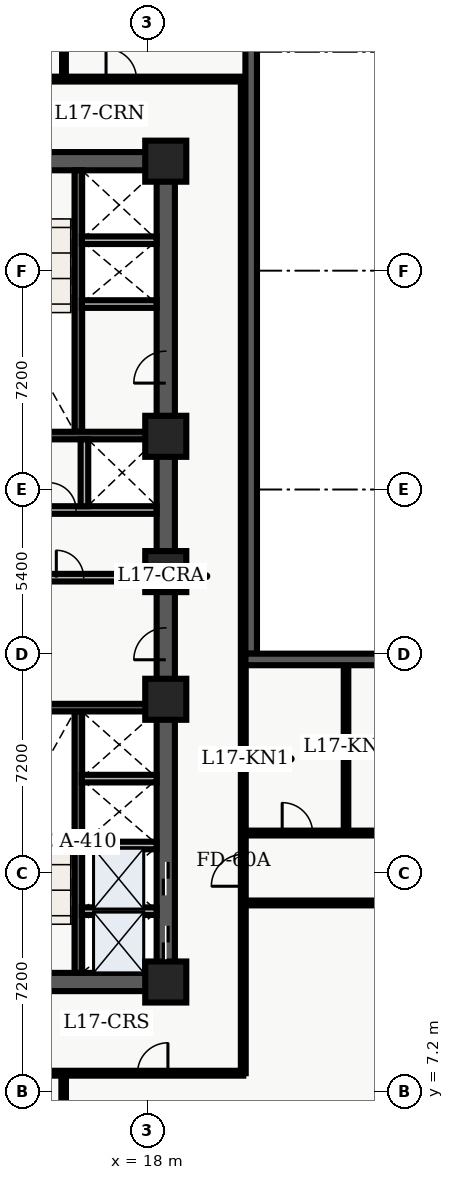
"""IFC4 building model, lengths in metres.
Left out: names, types, materials, properties, quantities, classifications, styles, units other than length and angle.
Written with IfcOpenShell. Run it as: python <this file> out.ifc"""

import sys

from ifc_helpers import new_model, entity, si_unit, converted_unit, direction, frame, origin_with_axes, origin_2d_with_axis, place, context, subcontext, project, spatial, polyline, rectangle, outline, extrude, element, fill, save


model = new_model("IFC4")
c1 = context("Model", 3, precision=1e-05, world=origin_with_axes(), true_north=direction((0.0, 1.0)))
c2 = subcontext(c1, "Body", "Model", "MODEL_VIEW")
j1 = project(units=[si_unit("LENGTHUNIT", "METRE"), converted_unit("PLANEANGLEUNIT", "DEGREE", entity("IfcPlaneAngleMeasure", 0.017), si_unit("PLANEANGLEUNIT", "RADIAN"), dimensions=[0, 0, 0, 0, 0, 0, 0])], contexts=[c1])
p1 = place(None, origin_with_axes())
s1 = spatial("IfcSite", under=j1, at=p1, CompositionType="ELEMENT")
p2 = place(p1, origin_with_axes())
s2 = spatial("IfcBuilding", under=s1, at=p2, CompositionType="ELEMENT")
p3 = place(p2, frame((0.0, 0.0, 71.7), z_axis=(0.0, 0.0, 1.0), x_axis=(1.0, 0.0, 0.0)))
s3 = spatial("IfcBuildingStorey", under=s2, at=p3, CompositionType="ELEMENT", Elevation=71.7)
p4 = place(p3, frame((11.4, 10.8, 0.0), z_axis=(0.0, 0.0, 1.0), x_axis=(1.0, 0.0, 0.0)))
e1 = element("IfcWall", 1, at=p4, inside=s3, PredefinedType="SHEAR", context=c2, shape_type="SweptSolid", body=[
    extrude(outline(polyline([(0.0, -0.3), (7.2, -0.3), (7.2, 0.3), (0.0, 0.3), (0.0, -0.3)])), origin_with_axes(), (0.0, 0.0, 1.0), 3.66),
])
p5 = place(p4, frame((2.625, 0.0, 0.0), z_axis=(0.0, 0.0, 1.0), x_axis=(1.0, 0.0, 0.0)))
e2 = element("IfcOpeningElement", 2, at=p5, cuts=e1, PredefinedType="OPENING", context=c2, shape_type="SweptSolid", body=[
    extrude(rectangle(XDim=1.05, YDim=0.62, at=origin_2d_with_axis()), origin_with_axes(), (0.0, 0.0, 1.0), 2.15),
])
p6 = place(p3, frame((11.4, 37.8, 0.0), z_axis=(0.0, 0.0, 1.0), x_axis=(1.0, 0.0, 0.0)))
e3 = element("IfcWall", 3, at=p6, inside=s3, PredefinedType="SHEAR", context=c2, shape_type="SweptSolid", body=[
    extrude(outline(polyline([(0.0, -0.3), (7.2, -0.3), (7.2, 0.3), (0.0, 0.3), (0.0, -0.3)])), origin_with_axes(), (0.0, 0.0, 1.0), 3.66),
])
p7 = place(p6, frame((2.625, 0.0, 0.0), z_axis=(0.0, 0.0, 1.0), x_axis=(1.0, 0.0, 0.0)))
e4 = element("IfcOpeningElement", 4, at=p7, cuts=e3, PredefinedType="OPENING", context=c2, shape_type="SweptSolid", body=[
    extrude(rectangle(XDim=1.05, YDim=0.62, at=origin_2d_with_axis()), origin_with_axes(), (0.0, 0.0, 1.0), 2.15),
])
p8 = place(p3, frame((18.6, 10.8, 0.0), z_axis=(0.0, 0.0, 1.0), x_axis=(0.0, 1.0, 0.0)))
e5 = element("IfcWall", 5, at=p8, inside=s3, PredefinedType="SHEAR", context=c2, shape_type="SweptSolid", body=[
    extrude(outline(polyline([(0.0, -0.3), (13.5, -0.3), (13.5, 0.3), (0.0, 0.3), (0.0, -0.3)])), origin_with_axes(), (0.0, 0.0, 1.0), 3.66),
])
p9 = place(p8, frame((1.3, 0.0, 0.0), z_axis=(0.0, 0.0, 1.0), x_axis=(1.0, 0.0, 0.0)))
e6 = element("IfcOpeningElement", 6, at=p9, cuts=e5, PredefinedType="OPENING", context=c2, shape_type="SweptSolid", body=[
    extrude(rectangle(XDim=1.1, YDim=0.62, at=origin_2d_with_axis()), origin_with_axes(), (0.0, 0.0, 1.0), 2.15),
])
p10 = place(p8, frame((3.4, 0.0, 0.0), z_axis=(0.0, 0.0, 1.0), x_axis=(1.0, 0.0, 0.0)))
e7 = element("IfcOpeningElement", 7, at=p10, cuts=e5, PredefinedType="OPENING", context=c2, shape_type="SweptSolid", body=[
    extrude(rectangle(XDim=1.1, YDim=0.62, at=origin_2d_with_axis()), origin_with_axes(), (0.0, 0.0, 1.0), 2.15),
])
p11 = place(p8, frame((11.125, 0.0, 0.0), z_axis=(0.0, 0.0, 1.0), x_axis=(1.0, 0.0, 0.0)))
e8 = element("IfcOpeningElement", 8, at=p11, cuts=e5, PredefinedType="OPENING", context=c2, shape_type="SweptSolid", body=[
    extrude(rectangle(XDim=1.05, YDim=0.62, at=origin_2d_with_axis()), origin_with_axes(), (0.0, 0.0, 1.0), 2.15),
])
p12 = place(p3, frame((18.6, 24.3, 0.0), z_axis=(0.0, 0.0, 1.0), x_axis=(0.0, 1.0, 0.0)))
e9 = element("IfcWall", 9, at=p12, inside=s3, PredefinedType="SHEAR", context=c2, shape_type="SweptSolid", body=[
    extrude(outline(polyline([(0.0, -0.3), (13.5, -0.3), (13.5, 0.3), (0.0, 0.3), (0.0, -0.3)])), origin_with_axes(), (0.0, 0.0, 1.0), 3.66),
])
p13 = place(p12, frame((6.725, 0.0, 0.0), z_axis=(0.0, 0.0, 1.0), x_axis=(1.0, 0.0, 0.0)))
e10 = element("IfcOpeningElement", 10, at=p13, cuts=e9, PredefinedType="OPENING", context=c2, shape_type="SweptSolid", body=[
    extrude(rectangle(XDim=1.05, YDim=0.62, at=origin_2d_with_axis()), origin_with_axes(), (0.0, 0.0, 1.0), 2.15),
])
p14 = place(p3, frame((15.725, 11.1, 0.0), z_axis=(0.0, 0.0, 1.0), x_axis=(0.0, 1.0, 0.0)))
e11 = element("IfcWall", 11, at=p14, inside=s3, PredefinedType="SHEAR", context=c2, shape_type="SweptSolid", body=[
    extrude(outline(polyline([(0.0, -0.125), (8.6, -0.125), (8.6, 0.125), (0.0, 0.125), (0.0, -0.125)])), origin_with_axes(), (0.0, 0.0, 1.0), 3.66),
])
p15 = place(p3, frame((11.7, 19.825, 0.0), z_axis=(0.0, 0.0, 1.0), x_axis=(1.0, 0.0, 0.0)))
e12 = element("IfcWall", 12, at=p15, inside=s3, PredefinedType="SHEAR", context=c2, shape_type="SweptSolid", body=[
    extrude(outline(polyline([(0.0, -0.125), (6.6, -0.125), (6.6, 0.125), (0.0, 0.125), (0.0, -0.125)])), origin_with_axes(), (0.0, 0.0, 1.0), 3.66),
])
p16 = place(p3, frame((15.725, 28.9, 0.0), z_axis=(0.0, 0.0, 1.0), x_axis=(0.0, 1.0, 0.0)))
e13 = element("IfcWall", 13, at=p16, inside=s3, PredefinedType="SHEAR", context=c2, shape_type="SweptSolid", body=[
    extrude(outline(polyline([(0.0, -0.125), (8.6, -0.125), (8.6, 0.125), (0.0, 0.125), (0.0, -0.125)])), origin_with_axes(), (0.0, 0.0, 1.0), 3.66),
])
p17 = place(p3, frame((11.7, 28.775, 0.0), z_axis=(0.0, 0.0, 1.0), x_axis=(1.0, 0.0, 0.0)))
e14 = element("IfcWall", 14, at=p17, inside=s3, PredefinedType="SHEAR", context=c2, shape_type="SweptSolid", body=[
    extrude(outline(polyline([(0.0, -0.125), (6.6, -0.125), (6.6, 0.125), (0.0, 0.125), (0.0, -0.125)])), origin_with_axes(), (0.0, 0.0, 1.0), 3.66),
])
p18 = place(p3, frame((11.7, 24.1, 0.0), z_axis=(0.0, 0.0, 1.0), x_axis=(1.0, 0.0, 0.0)))
e15 = element("IfcWall", 15, at=p18, inside=s3, PredefinedType="SOLIDWALL", context=c2, shape_type="SweptSolid", body=[
    extrude(outline(polyline([(0.0, -0.125), (6.6, -0.125), (6.6, 0.125), (0.0, 0.125), (0.0, -0.125)])), origin_with_axes(), (0.0, 0.0, 1.0), 2.7),
])
p19 = place(p18, frame((3.75, 0.0, 0.0), z_axis=(0.0, 0.0, 1.0), x_axis=(1.0, 0.0, 0.0)))
e16 = element("IfcOpeningElement", 16, at=p19, cuts=e15, PredefinedType="OPENING", context=c2, shape_type="SweptSolid", body=[
    extrude(rectangle(XDim=0.9, YDim=0.27, at=origin_2d_with_axis()), origin_with_axes(), (0.0, 0.0, 1.0), 2.15),
])
p20 = place(p3, frame((11.7, 26.325, 0.0), z_axis=(0.0, 0.0, 1.0), x_axis=(1.0, 0.0, 0.0)))
e17 = element("IfcWall", 17, at=p20, inside=s3, PredefinedType="SOLIDWALL", context=c2, shape_type="SweptSolid", body=[
    extrude(outline(polyline([(0.0, -0.125), (6.6, -0.125), (6.6, 0.125), (0.0, 0.125), (0.0, -0.125)])), origin_with_axes(), (0.0, 0.0, 1.0), 2.7),
])
p21 = place(p20, frame((3.5, 0.0, 0.0), z_axis=(0.0, 0.0, 1.0), x_axis=(1.0, 0.0, 0.0)))
e18 = element("IfcOpeningElement", 18, at=p21, cuts=e17, PredefinedType="OPENING", context=c2, shape_type="SweptSolid", body=[
    extrude(rectangle(XDim=0.9, YDim=0.27, at=origin_2d_with_axis()), origin_with_axes(), (0.0, 0.0, 1.0), 2.15),
])
p22 = place(p3, frame((15.925, 26.45, 0.0), z_axis=(0.0, 0.0, 1.0), x_axis=(0.0, 1.0, 0.0)))
e19 = element("IfcWall", 19, at=p22, inside=s3, PredefinedType="SOLIDWALL", context=c2, shape_type="SweptSolid", body=[
    extrude(outline(polyline([(0.0, -0.125), (2.2, -0.125), (2.2, 0.125), (0.0, 0.125), (0.0, -0.125)])), origin_with_axes(), (0.0, 0.0, 1.0), 2.7),
])
for number, where, z_axis, x_axis in (
    (20, (18.6, 10.8, 0.0), (0.0, 0.0, 1.0), (1.0, 0.0, 0.0)),
    (21, (18.6, 20.1, 0.0), (0.0, 0.0, 1.0), (1.0, 0.0, 0.0)),
    (22, (18.6, 24.3, 0.0), (0.0, 0.0, 1.0), (1.0, 0.0, 0.0)),
    (23, (18.6, 28.75, 0.0), (0.0, 0.0, 1.0), (1.0, 0.0, 0.0)),
    (24, (18.6, 37.8, 0.0), (0.0, 0.0, 1.0), (1.0, 0.0, 0.0)),
):
    element("IfcColumn", number, at=place(p3, frame(where, z_axis=z_axis, x_axis=x_axis)), inside=s3, PredefinedType="COLUMN", context=c2, shape_type="SweptSolid", body=[
        extrude(rectangle(XDim=1.35, YDim=1.35, at=origin_2d_with_axis()), origin_with_axes(), (0.0, 0.0, 1.0), 3.9),
    ])
for number, where, z_axis, x_axis in (
    (25, (15.84, 13.13, 0.0), (0.0, 0.0, 1.0), (1.0, 0.0, 0.0)),
    (26, (15.84, 15.29, 0.0), (0.0, 0.0, 1.0), (1.0, 0.0, 0.0)),
    (27, (15.84, 17.49, 0.0), (0.0, 0.0, 1.0), (1.0, 0.0, 0.0)),
    (28, (15.84, 33.1, 0.0), (0.0, 0.0, 1.0), (1.0, 0.0, 0.0)),
    (29, (15.84, 35.2, 0.0), (0.0, 0.0, 1.0), (1.0, 0.0, 0.0)),
):
    element("IfcWall", number, at=place(p3, frame(where, z_axis=z_axis, x_axis=x_axis)), inside=s3, PredefinedType="SOLIDWALL", context=c2, shape_type="SweptSolid", body=[
        extrude(outline(polyline([(0.0, -0.125), (2.46, -0.125), (2.46, 0.125), (0.0, 0.125), (0.0, -0.125)])), origin_with_axes(), (0.0, 0.0, 1.0), 2.7),
    ])
p23 = place(p3, frame((2.6, 7.8, 0.0), z_axis=(0.0, 0.0, 1.0), x_axis=(1.0, 0.0, 0.0)))
e30 = element("IfcWall", 30, at=p23, inside=s3, PredefinedType="PARTITIONING", context=c2, shape_type="SweptSolid", body=[
    extrude(outline(polyline([(0.0, -0.08), (18.55, -0.08), (18.55, 0.08), (0.0, 0.08), (0.0, -0.08)])), origin_with_axes(), (0.0, 0.0, 1.0), 2.7),
])
p24 = place(p23, frame((0.947, 0.0, 0.0), z_axis=(0.0, 0.0, 1.0), x_axis=(1.0, 0.0, 0.0)))
e31 = element("IfcOpeningElement", 31, at=p24, cuts=e30, PredefinedType="OPENING", context=c2, shape_type="SweptSolid", body=[
    extrude(rectangle(XDim=1.0, YDim=0.18, at=origin_2d_with_axis()), origin_with_axes(), (0.0, 0.0, 1.0), 2.15),
])
p25 = place(p23, frame((6.232, 0.0, 0.0), z_axis=(0.0, 0.0, 1.0), x_axis=(1.0, 0.0, 0.0)))
e32 = element("IfcOpeningElement", 32, at=p25, cuts=e30, PredefinedType="OPENING", context=c2, shape_type="SweptSolid", body=[
    extrude(rectangle(XDim=1.0, YDim=0.18, at=origin_2d_with_axis()), origin_with_axes(), (0.0, 0.0, 1.0), 2.15),
])
p26 = place(p23, frame((10.721, 0.0, 0.0), z_axis=(0.0, 0.0, 1.0), x_axis=(1.0, 0.0, 0.0)))
e33 = element("IfcOpeningElement", 33, at=p26, cuts=e30, PredefinedType="OPENING", context=c2, shape_type="SweptSolid", body=[
    extrude(rectangle(XDim=1.0, YDim=0.18, at=origin_2d_with_axis()), origin_with_axes(), (0.0, 0.0, 1.0), 2.15),
])
p27 = place(p23, frame((15.571, 0.0, 0.0), z_axis=(0.0, 0.0, 1.0), x_axis=(1.0, 0.0, 0.0)))
e34 = element("IfcOpeningElement", 34, at=p27, cuts=e30, PredefinedType="OPENING", context=c2, shape_type="SweptSolid", body=[
    extrude(rectangle(XDim=1.0, YDim=0.18, at=origin_2d_with_axis()), origin_with_axes(), (0.0, 0.0, 1.0), 2.15),
])
p28 = place(p3, frame((2.6, 40.5, 0.0), z_axis=(0.0, 0.0, 1.0), x_axis=(1.0, 0.0, 0.0)))
e35 = element("IfcWall", 35, at=p28, inside=s3, PredefinedType="PARTITIONING", context=c2, shape_type="SweptSolid", body=[
    extrude(outline(polyline([(0.0, -0.08), (18.65, -0.08), (18.65, 0.08), (0.0, 0.08), (0.0, -0.08)])), origin_with_axes(), (0.0, 0.0, 1.0), 2.7),
])
p29 = place(p28, frame((4.176, 0.0, 0.0), z_axis=(0.0, 0.0, 1.0), x_axis=(1.0, 0.0, 0.0)))
e36 = element("IfcOpeningElement", 36, at=p29, cuts=e35, PredefinedType="OPENING", context=c2, shape_type="SweptSolid", body=[
    extrude(rectangle(XDim=1.0, YDim=0.18, at=origin_2d_with_axis()), origin_with_axes(), (0.0, 0.0, 1.0), 2.15),
])
p30 = place(p28, frame((9.257, 0.0, 0.0), z_axis=(0.0, 0.0, 1.0), x_axis=(1.0, 0.0, 0.0)))
e37 = element("IfcOpeningElement", 37, at=p30, cuts=e35, PredefinedType="OPENING", context=c2, shape_type="SweptSolid", body=[
    extrude(rectangle(XDim=1.2, YDim=0.18, at=origin_2d_with_axis()), origin_with_axes(), (0.0, 0.0, 1.0), 2.2),
])
p31 = place(p28, frame((14.536, 0.0, 0.0), z_axis=(0.0, 0.0, 1.0), x_axis=(1.0, 0.0, 0.0)))
e38 = element("IfcOpeningElement", 38, at=p31, cuts=e35, PredefinedType="OPENING", context=c2, shape_type="SweptSolid", body=[
    extrude(rectangle(XDim=1.0, YDim=0.18, at=origin_2d_with_axis()), origin_with_axes(), (0.0, 0.0, 1.0), 2.15),
])
p32 = place(p3, frame((21.15, 7.8, 0.0), z_axis=(0.0, 0.0, 1.0), x_axis=(0.0, 1.0, 0.0)))
e39 = element("IfcWall", 39, at=p32, inside=s3, PredefinedType="PARTITIONING", context=c2, shape_type="SweptSolid", body=[
    extrude(outline(polyline([(0.0, -0.08), (32.7, -0.08), (32.7, 0.08), (0.0, 0.08), (0.0, -0.08)])), origin_with_axes(), (0.0, 0.0, 1.0), 2.7),
])
p33 = place(p32, frame((6.675, 0.0, 0.0), z_axis=(0.0, 0.0, 1.0), x_axis=(1.0, 0.0, 0.0)))
e40 = element("IfcOpeningElement", 40, at=p33, cuts=e39, PredefinedType="OPENING", context=c2, shape_type="SweptSolid", body=[
    extrude(rectangle(XDim=1.05, YDim=0.18, at=origin_2d_with_axis()), origin_with_axes(), (0.0, 0.0, 1.0), 2.15),
])
p34 = place(p3, frame((15.242, 0.36, 0.0), z_axis=(0.0, 0.0, 1.0), x_axis=(0.0, 1.0, 0.0)))
e41 = element("IfcWall", 41, at=p34, inside=s3, PredefinedType="PARTITIONING", context=c2, shape_type="SweptSolid", body=[
    extrude(outline(polyline([(0.0, -0.075), (7.34, -0.075), (7.34, 0.075), (0.0, 0.075), (0.0, -0.075)])), origin_with_axes(), (0.0, 0.0, 1.0), 2.7),
])
p35 = place(p3, frame((15.252, 40.6, 0.0), z_axis=(0.0, 0.0, 1.0), x_axis=(0.0, 1.0, 0.0)))
e42 = element("IfcWall", 42, at=p35, inside=s3, PredefinedType="PARTITIONING", context=c2, shape_type="SweptSolid", body=[
    extrude(outline(polyline([(0.0, -0.062), (7.64, -0.062), (7.64, 0.062), (0.0, 0.062), (0.0, -0.062)])), origin_with_axes(), (0.0, 0.0, 1.0), 2.7),
])
p36 = place(p3, frame((21.15, 13.4, 0.0), z_axis=(0.0, 0.0, 1.0), x_axis=(1.0, 0.0, 0.0)))
e43 = element("IfcWall", 43, at=p36, inside=s3, PredefinedType="PARTITIONING", context=c2, shape_type="SweptSolid", body=[
    extrude(outline(polyline([(0.0, -0.08), (15.2, -0.08), (15.2, 0.08), (0.0, 0.08), (0.0, -0.08)])), origin_with_axes(), (0.0, 0.0, 1.0), 2.7),
])
p37 = place(p36, frame((7.65, 0.0, 0.0), z_axis=(0.0, 0.0, 1.0), x_axis=(1.0, 0.0, 0.0)))
e44 = element("IfcOpeningElement", 44, at=p37, cuts=e43, PredefinedType="OPENING", context=c2, shape_type="SweptSolid", body=[
    extrude(rectangle(XDim=1.0, YDim=0.18, at=origin_2d_with_axis()), origin_with_axes(), (0.0, 0.0, 1.0), 2.15),
])
p38 = place(p3, frame((21.15, 15.7, 0.0), z_axis=(0.0, 0.0, 1.0), x_axis=(1.0, 0.0, 0.0)))
e45 = element("IfcWall", 45, at=p38, inside=s3, PredefinedType="PARTITIONING", context=c2, shape_type="SweptSolid", body=[
    extrude(outline(polyline([(0.0, -0.08), (15.2, -0.08), (15.2, 0.08), (0.0, 0.08), (0.0, -0.08)])), origin_with_axes(), (0.0, 0.0, 1.0), 2.7),
])
p39 = place(p38, frame((1.78, 0.0, 0.0), z_axis=(0.0, 0.0, 1.0), x_axis=(1.0, 0.0, 0.0)))
e46 = element("IfcOpeningElement", 46, at=p39, cuts=e45, PredefinedType="OPENING", context=c2, shape_type="SweptSolid", body=[
    extrude(rectangle(XDim=1.0, YDim=0.18, at=origin_2d_with_axis()), origin_with_axes(), (0.0, 0.0, 1.0), 2.15),
])
p40 = place(p38, frame((4.915, 0.0, 0.0), z_axis=(0.0, 0.0, 1.0), x_axis=(1.0, 0.0, 0.0)))
e47 = element("IfcOpeningElement", 47, at=p40, cuts=e45, PredefinedType="OPENING", context=c2, shape_type="SweptSolid", body=[
    extrude(rectangle(XDim=1.0, YDim=0.18, at=origin_2d_with_axis()), origin_with_axes(), (0.0, 0.0, 1.0), 2.15),
])
p41 = place(p38, frame((8.582, 0.0, 0.0), z_axis=(0.0, 0.0, 1.0), x_axis=(1.0, 0.0, 0.0)))
e48 = element("IfcOpeningElement", 48, at=p41, cuts=e45, PredefinedType="OPENING", context=c2, shape_type="SweptSolid", body=[
    extrude(rectangle(XDim=1.0, YDim=0.18, at=origin_2d_with_axis()), origin_with_axes(), (0.0, 0.0, 1.0), 2.15),
])
p42 = place(p38, frame((12.918, 0.0, 0.0), z_axis=(0.0, 0.0, 1.0), x_axis=(1.0, 0.0, 0.0)))
e49 = element("IfcOpeningElement", 49, at=p42, cuts=e45, PredefinedType="OPENING", context=c2, shape_type="SweptSolid", body=[
    extrude(rectangle(XDim=1.0, YDim=0.18, at=origin_2d_with_axis()), origin_with_axes(), (0.0, 0.0, 1.0), 2.15),
])
p43 = place(p3, frame((24.529, 15.82, 0.0), z_axis=(0.0, 0.0, 1.0), x_axis=(0.0, 1.0, 0.0)))
e50 = element("IfcWall", 50, at=p43, inside=s3, PredefinedType="PARTITIONING", context=c2, shape_type="SweptSolid", body=[
    extrude(outline(polyline([(0.0, -0.075), (5.405, -0.075), (5.405, 0.075), (0.0, 0.075), (0.0, -0.075)])), origin_with_axes(), (0.0, 0.0, 1.0), 2.7),
])
p44 = place(p3, frame((21.41, 45.82, 0.0), z_axis=(0.0, 0.0, 1.0), x_axis=(0.0, -1.0, 0.0)))
e51 = element("IfcWall", 51, at=p44, inside=s3, PredefinedType="SOLIDWALL", context=c2, shape_type="SweptSolid", body=[
    extrude(outline(polyline([(0.0, -0.19), (24.22, -0.19), (24.22, 0.19), (0.0, 0.19), (0.0, -0.19)])), origin_with_axes(), (0.0, 0.0, 1.0), 3.66),
])
p45 = place(p44, frame((2.902, 0.0, 0.45), z_axis=(0.0, 0.0, 1.0), x_axis=(1.0, 0.0, 0.0)))
e52 = element("IfcOpeningElement", 52, at=p45, cuts=e51, PredefinedType="OPENING", context=c2, shape_type="SweptSolid", body=[
    extrude(rectangle(XDim=2.1, YDim=0.4, at=origin_2d_with_axis()), origin_with_axes(), (0.0, 0.0, 1.0), 2.2),
])
p46 = place(p3, frame((21.22, 21.41, 0.0), z_axis=(0.0, 0.0, 1.0), x_axis=(1.0, 0.0, 0.0)))
e53 = element("IfcWall", 53, at=p46, inside=s3, PredefinedType="SOLIDWALL", context=c2, shape_type="SweptSolid", body=[
    extrude(outline(polyline([(0.0, -0.19), (17.18, -0.19), (17.18, 0.19), (0.0, 0.19), (0.0, -0.19)])), origin_with_axes(), (0.0, 0.0, 1.0), 3.66),
])
p47 = place(p46, frame((8.59, 0.0, 0.45), z_axis=(0.0, 0.0, 1.0), x_axis=(1.0, 0.0, 0.0)))
e54 = element("IfcOpeningElement", 54, at=p47, cuts=e53, PredefinedType="OPENING", context=c2, shape_type="SweptSolid", body=[
    extrude(rectangle(XDim=2.1, YDim=0.4, at=origin_2d_with_axis()), origin_with_axes(), (0.0, 0.0, 1.0), 2.2),
])
p48 = place(p46, frame((13.467, 0.0, 0.45), z_axis=(0.0, 0.0, 1.0), x_axis=(1.0, 0.0, 0.0)))
e55 = element("IfcOpeningElement", 55, at=p48, cuts=e53, PredefinedType="OPENING", context=c2, shape_type="SweptSolid", body=[
    extrude(rectangle(XDim=2.1, YDim=0.4, at=origin_2d_with_axis()), origin_with_axes(), (0.0, 0.0, 1.0), 2.2),
])
p49 = place(p8, frame((1.3, 0.0, 0.0), z_axis=(0.0, 0.0, 1.0), x_axis=(1.0, 0.0, 0.0)))
e56 = element("IfcDoor", 56, at=p49, inside=s3, OperationType="SLIDING_TO_LEFT", PredefinedType="DOOR", context=c2, shape_type="SweptSolid", body=[
    extrude(rectangle(XDim=1.1, YDim=0.09, at=origin_2d_with_axis()), origin_with_axes(), (0.0, 0.0, 1.0), 2.15),
])
fill(e6, e56)
p50 = place(p8, frame((3.4, 0.0, 0.0), z_axis=(0.0, 0.0, 1.0), x_axis=(1.0, 0.0, 0.0)))
e57 = element("IfcDoor", 57, at=p50, inside=s3, OperationType="SLIDING_TO_RIGHT", PredefinedType="DOOR", context=c2, shape_type="SweptSolid", body=[
    extrude(rectangle(XDim=1.1, YDim=0.09, at=origin_2d_with_axis()), origin_with_axes(), (0.0, 0.0, 1.0), 2.15),
])
fill(e7, e57)
p51 = place(p8, frame((11.125, 0.0, 0.0), z_axis=(0.0, 0.0, 1.0), x_axis=(1.0, 0.0, 0.0)))
e58 = element("IfcDoor", 58, at=p51, inside=s3, OperationType="SINGLE_SWING_LEFT", PredefinedType="DOOR", context=c2, shape_type="SweptSolid", body=[
    extrude(rectangle(XDim=1.05, YDim=0.09, at=origin_2d_with_axis()), origin_with_axes(), (0.0, 0.0, 1.0), 2.15),
])
fill(e8, e58)
p52 = place(p18, frame((3.75, 0.0, 0.0), z_axis=(0.0, 0.0, 1.0), x_axis=(1.0, 0.0, 0.0)))
e59 = element("IfcDoor", 59, at=p52, inside=s3, OperationType="SINGLE_SWING_LEFT", PredefinedType="DOOR", context=c2, shape_type="SweptSolid", body=[
    extrude(rectangle(XDim=0.9, YDim=0.09, at=origin_2d_with_axis()), origin_with_axes(), (0.0, 0.0, 1.0), 2.15),
])
fill(e16, e59)
p53 = place(p20, frame((3.5, 0.0, 0.0), z_axis=(0.0, 0.0, 1.0), x_axis=(1.0, 0.0, 0.0)))
e60 = element("IfcDoor", 60, at=p53, inside=s3, OperationType="SINGLE_SWING_LEFT", PredefinedType="DOOR", context=c2, shape_type="SweptSolid", body=[
    extrude(rectangle(XDim=0.9, YDim=0.09, at=origin_2d_with_axis()), origin_with_axes(), (0.0, 0.0, 1.0), 2.15),
])
fill(e18, e60)
p54 = place(p12, frame((6.725, 0.0, 0.0), z_axis=(0.0, 0.0, 1.0), x_axis=(1.0, 0.0, 0.0)))
e61 = element("IfcDoor", 61, at=p54, inside=s3, OperationType="SINGLE_SWING_LEFT", PredefinedType="DOOR", context=c2, shape_type="SweptSolid", body=[
    extrude(rectangle(XDim=1.05, YDim=0.09, at=origin_2d_with_axis()), origin_with_axes(), (0.0, 0.0, 1.0), 2.15),
])
fill(e10, e61)
p55 = place(p23, frame((15.571, 0.0, 0.0), z_axis=(0.0, 0.0, 1.0), x_axis=(1.0, 0.0, 0.0)))
e62 = element("IfcDoor", 62, at=p55, inside=s3, OperationType="SINGLE_SWING_RIGHT", PredefinedType="DOOR", context=c2, shape_type="SweptSolid", body=[
    extrude(rectangle(XDim=1.0, YDim=0.09, at=origin_2d_with_axis()), origin_with_axes(), (0.0, 0.0, 1.0), 2.15),
])
fill(e34, e62)
p56 = place(p28, frame((14.536, 0.0, 0.0), z_axis=(0.0, 0.0, 1.0), x_axis=(1.0, 0.0, 0.0)))
e63 = element("IfcDoor", 63, at=p56, inside=s3, OperationType="SINGLE_SWING_LEFT", PredefinedType="DOOR", context=c2, shape_type="SweptSolid", body=[
    extrude(rectangle(XDim=1.0, YDim=0.09, at=origin_2d_with_axis()), origin_with_axes(), (0.0, 0.0, 1.0), 2.15),
])
fill(e38, e63)
p57 = place(p32, frame((6.675, 0.0, 0.0), z_axis=(0.0, 0.0, 1.0), x_axis=(1.0, 0.0, 0.0)))
e64 = element("IfcDoor", 64, at=p57, inside=s3, OperationType="SINGLE_SWING_LEFT", PredefinedType="DOOR", context=c2, shape_type="SweptSolid", body=[
    extrude(rectangle(XDim=1.05, YDim=0.09, at=origin_2d_with_axis()), origin_with_axes(), (0.0, 0.0, 1.0), 2.15),
])
fill(e40, e64)
p58 = place(p38, frame((1.78, 0.0, 0.0), z_axis=(0.0, 0.0, 1.0), x_axis=(1.0, 0.0, 0.0)))
e65 = element("IfcDoor", 65, at=p58, inside=s3, OperationType="SINGLE_SWING_LEFT", PredefinedType="DOOR", context=c2, shape_type="SweptSolid", body=[
    extrude(rectangle(XDim=1.0, YDim=0.09, at=origin_2d_with_axis()), origin_with_axes(), (0.0, 0.0, 1.0), 2.15),
])
fill(e46, e65)
save(model, sys.argv[1])
